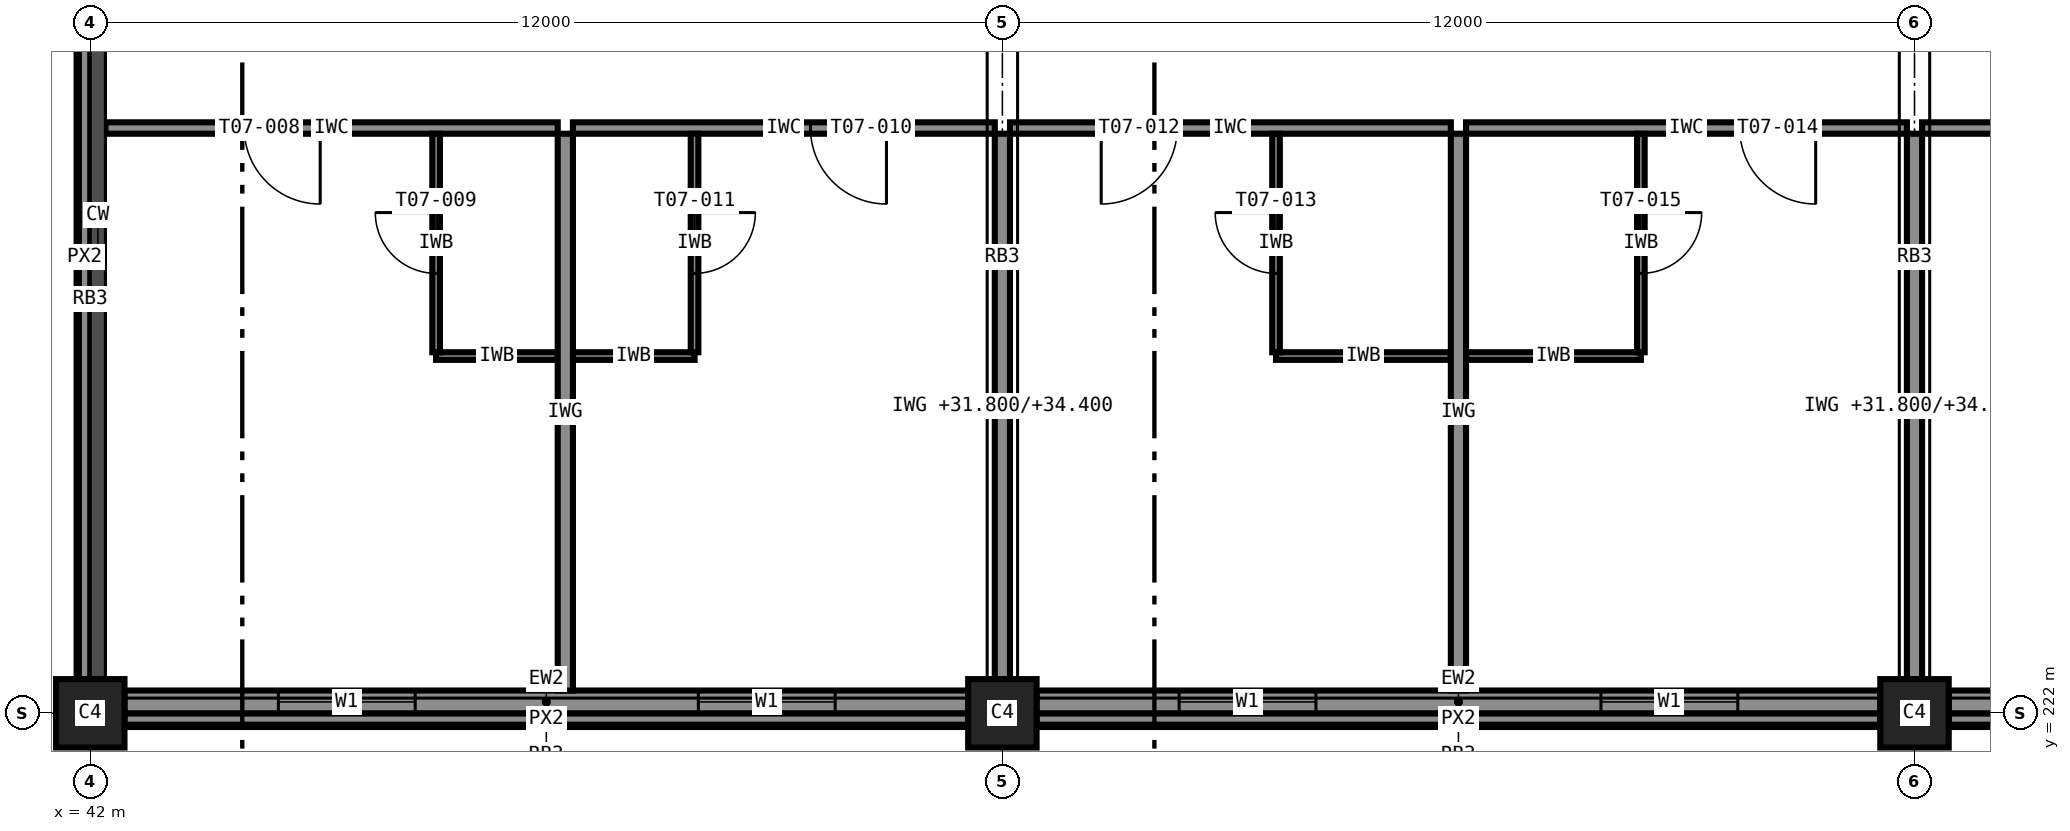
"""IFC4 building model, lengths in metres.
Left out: names, types, materials, properties, quantities, classifications, styles, units other than length and angle.
Written with IfcOpenShell. Run it as: python <this file> out.ifc"""

import sys

from ifc_helpers import new_model, si_unit, direction, frame, frame_2d, origin, origin_2d, place, context, subcontext, project, spatial, rectangle, extrude, element, fill, save


model = new_model("IFC4")
c1 = context("Model", 3, precision=1e-05, world=origin(), true_north=direction((0.0, 1.0)))
c2 = subcontext(c1, "Body", "Model", "MODEL_VIEW")
j1 = project(units=[si_unit("LENGTHUNIT", "METRE"), si_unit("PLANEANGLEUNIT", "RADIAN")], contexts=[c1])
p1 = place(None, origin())
s1 = spatial("IfcSite", under=j1, at=p1, CompositionType="ELEMENT")
p2 = place(p1, origin())
s2 = spatial("IfcBuilding", under=s1, at=p2, CompositionType="ELEMENT")
p3 = place(p2, frame((0.0, 0.0, 31.8)))
s3 = spatial("IfcBuildingStorey", under=s2, at=p3, CompositionType="ELEMENT", Elevation=31.8)
for number, where, z_axis, x_axis in (
    (1, (42.0, 222.0, 0.0), (0.0, 0.0, 1.0), (1.0, 0.0, 0.0)),
    (2, (54.0, 222.0, 0.0), (0.0, 0.0, 1.0), (1.0, 0.0, 0.0)),
    (3, (66.0, 222.0, 0.0), (0.0, 0.0, 1.0), (1.0, 0.0, 0.0)),
):
    element("IfcColumn", number, at=place(p3, frame(where, z_axis=z_axis, x_axis=x_axis)), inside=s3, PredefinedType="COLUMN", context=c2, shape_type="SweptSolid", body=[
        extrude(rectangle(XDim=0.9, YDim=0.9, at=origin_2d()), origin(), (0.0, 0.0, 1.0), 3.6),
    ])
p4 = place(p3, frame((42.45, 222.15, 0.0), z_axis=(0.0, 0.0, 1.0), x_axis=(1.0, 0.0, 0.0)))
e4 = element("IfcWall", 4, at=p4, inside=s3, PredefinedType="STANDARD", context=c2, shape_type="SweptSolid", body=[
    extrude(rectangle(XDim=11.1, YDim=0.3, at=frame_2d((5.55, 0.0))), origin(), (0.0, 0.0, 1.0), 2.6),
])
p5 = place(p4, frame((2.025, 0.0, 0.85)))
e5 = element("IfcOpeningElement", 5, at=p5, cuts=e4, PredefinedType="OPENING", context=c2, shape_type="SweptSolid", body=[
    extrude(rectangle(XDim=1.8, YDim=1.75, at=frame_2d((0.9, 0.875))), frame((0.0, 0.16, 0.0), z_axis=(0.0, -1.0, 0.0), x_axis=(1.0, 0.0, 0.0)), (0.0, 0.0, 1.0), 0.32),
])
p6 = place(p4, frame((7.55, 0.0, 0.85)))
e6 = element("IfcOpeningElement", 6, at=p6, cuts=e4, PredefinedType="OPENING", context=c2, shape_type="SweptSolid", body=[
    extrude(rectangle(XDim=1.8, YDim=1.75, at=frame_2d((0.9, 0.875))), frame((0.0, 0.16, 0.0), z_axis=(0.0, -1.0, 0.0), x_axis=(1.0, 0.0, 0.0)), (0.0, 0.0, 1.0), 0.32),
])
p7 = place(p3, frame((54.45, 222.15, 0.0), z_axis=(0.0, 0.0, 1.0), x_axis=(1.0, 0.0, 0.0)))
e7 = element("IfcWall", 7, at=p7, inside=s3, PredefinedType="STANDARD", context=c2, shape_type="SweptSolid", body=[
    extrude(rectangle(XDim=11.1, YDim=0.3, at=frame_2d((5.55, 0.0))), origin(), (0.0, 0.0, 1.0), 2.6),
])
p8 = place(p7, frame((1.875, 0.0, 0.85)))
e8 = element("IfcOpeningElement", 8, at=p8, cuts=e7, PredefinedType="OPENING", context=c2, shape_type="SweptSolid", body=[
    extrude(rectangle(XDim=1.8, YDim=1.75, at=frame_2d((0.9, 0.875))), frame((0.0, 0.16, 0.0), z_axis=(0.0, -1.0, 0.0), x_axis=(1.0, 0.0, 0.0)), (0.0, 0.0, 1.0), 0.32),
])
p9 = place(p7, frame((7.425, 0.0, 0.85)))
e9 = element("IfcOpeningElement", 9, at=p9, cuts=e7, PredefinedType="OPENING", context=c2, shape_type="SweptSolid", body=[
    extrude(rectangle(XDim=1.8, YDim=1.75, at=frame_2d((0.9, 0.875))), frame((0.0, 0.16, 0.0), z_axis=(0.0, -1.0, 0.0), x_axis=(1.0, 0.0, 0.0)), (0.0, 0.0, 1.0), 0.32),
])
p10 = place(p3, frame((66.45, 222.15, 0.0), z_axis=(0.0, 0.0, 1.0), x_axis=(1.0, 0.0, 0.0)))
e10 = element("IfcWall", 10, at=p10, inside=s3, PredefinedType="STANDARD", context=c2, shape_type="SweptSolid", body=[
    extrude(rectangle(XDim=11.1, YDim=0.3, at=frame_2d((5.55, 0.0))), origin(), (0.0, 0.0, 1.0), 2.6),
])
p11 = place(p10, frame((0.95, 0.0, 0.85)))
e11 = element("IfcOpeningElement", 11, at=p11, cuts=e10, PredefinedType="OPENING", context=c2, shape_type="SweptSolid", body=[
    extrude(rectangle(XDim=1.8, YDim=1.75, at=frame_2d((0.9, 0.875))), frame((0.0, 0.16, 0.0), z_axis=(0.0, -1.0, 0.0), x_axis=(1.0, 0.0, 0.0)), (0.0, 0.0, 1.0), 0.32),
])
p12 = place(p10, frame((4.65, 0.0, 0.85)))
e12 = element("IfcOpeningElement", 12, at=p12, cuts=e10, PredefinedType="OPENING", context=c2, shape_type="SweptSolid", body=[
    extrude(rectangle(XDim=1.8, YDim=1.75, at=frame_2d((0.9, 0.875))), frame((0.0, 0.16, 0.0), z_axis=(0.0, -1.0, 0.0), x_axis=(1.0, 0.0, 0.0)), (0.0, 0.0, 1.0), 0.32),
])
p13 = place(p10, frame((8.35, 0.0, 0.85)))
e13 = element("IfcOpeningElement", 13, at=p13, cuts=e10, PredefinedType="OPENING", context=c2, shape_type="SweptSolid", body=[
    extrude(rectangle(XDim=1.8, YDim=1.75, at=frame_2d((0.9, 0.875))), frame((0.0, 0.16, 0.0), z_axis=(0.0, -1.0, 0.0), x_axis=(1.0, 0.0, 0.0)), (0.0, 0.0, 1.0), 0.32),
])
for number, where, z_axis, x_axis in (
    (14, (42.45, 221.925, 3.4), (0.0, 0.0, 1.0), (1.0, 0.0, 0.0)),
    (15, (54.45, 221.925, 3.4), (0.0, 0.0, 1.0), (1.0, 0.0, 0.0)),
    (16, (66.45, 221.925, 3.4), (0.0, 0.0, 1.0), (1.0, 0.0, 0.0)),
    (17, (41.925, 233.55, 3.4), (0.0, 0.0, 1.0), (0.0, -1.0, 0.0)),
):
    element("IfcWall", number, at=place(p3, frame(where, z_axis=z_axis, x_axis=x_axis)), inside=s3, PredefinedType="STANDARD", context=c2, shape_type="SweptSolid", body=[
        extrude(rectangle(XDim=11.1, YDim=0.15, at=frame_2d((5.55, 0.0))), origin(), (0.0, 0.0, 1.0), 0.2),
    ])
p14 = place(p3, frame((48.15, 229.7, 0.0), z_axis=(0.0, 0.0, 1.0), x_axis=(-1.0, 0.0, 0.0)))
e18 = element("IfcWall", 18, at=p14, inside=s3, PredefinedType="PARTITIONING", context=c2, shape_type="SweptSolid", body=[
    extrude(rectangle(XDim=5.95, YDim=0.15, at=frame_2d((2.975, 0.0))), origin(), (0.0, 0.0, 1.0), 3.4),
])
p15 = place(p14, frame((3.125, 0.0, 0.0)))
e19 = element("IfcOpeningElement", 19, at=p15, cuts=e18, PredefinedType="OPENING", context=c2, shape_type="SweptSolid", body=[
    extrude(rectangle(XDim=1.0, YDim=2.1, at=frame_2d((0.5, 1.05))), frame((0.0, 0.085, 0.0), z_axis=(0.0, -1.0, 0.0), x_axis=(1.0, 0.0, 0.0)), (0.0, 0.0, 1.0), 0.17),
])
p16 = place(p3, frame((46.55, 226.7, 0.0), z_axis=(0.0, 0.0, 1.0), x_axis=(1.0, 0.0, 0.0)))
e20 = element("IfcWall", 20, at=p16, inside=s3, PredefinedType="PARTITIONING", context=c2, shape_type="SweptSolid", body=[
    extrude(rectangle(XDim=1.6, YDim=0.1, at=frame_2d((0.8, 0.0))), origin(), (0.0, 0.0, 1.0), 3.4),
])
p17 = place(p3, frame((46.55, 226.75, 0.0), z_axis=(0.0, 0.0, 1.0), x_axis=(0.0, 1.0, 0.0)))
e21 = element("IfcWall", 21, at=p17, inside=s3, PredefinedType="PARTITIONING", context=c2, shape_type="SweptSolid", body=[
    extrude(rectangle(XDim=2.875, YDim=0.1, at=frame_2d((1.438, 0.0))), origin(), (0.0, 0.0, 1.0), 3.4),
])
p18 = place(p17, frame((1.038, 0.0, 0.0)))
e22 = element("IfcOpeningElement", 22, at=p18, cuts=e21, PredefinedType="OPENING", context=c2, shape_type="SweptSolid", body=[
    extrude(rectangle(XDim=0.8, YDim=2.1, at=frame_2d((0.4, 1.05))), frame((0.0, 0.06, 0.0), z_axis=(0.0, -1.0, 0.0), x_axis=(1.0, 0.0, 0.0)), (0.0, 0.0, 1.0), 0.12),
])
p19 = place(p3, frame((53.9, 229.7, 0.0), z_axis=(0.0, 0.0, 1.0), x_axis=(-1.0, 0.0, 0.0)))
e23 = element("IfcWall", 23, at=p19, inside=s3, PredefinedType="PARTITIONING", context=c2, shape_type="SweptSolid", body=[
    extrude(rectangle(XDim=5.55, YDim=0.15, at=frame_2d((2.775, 0.0))), origin(), (0.0, 0.0, 1.0), 3.4),
])
p20 = place(p19, frame((1.425, 0.0, 0.0)))
e24 = element("IfcOpeningElement", 24, at=p20, cuts=e23, PredefinedType="OPENING", context=c2, shape_type="SweptSolid", body=[
    extrude(rectangle(XDim=1.0, YDim=2.1, at=frame_2d((0.5, 1.05))), frame((0.0, 0.085, 0.0), z_axis=(0.0, -1.0, 0.0), x_axis=(1.0, 0.0, 0.0)), (0.0, 0.0, 1.0), 0.17),
])
p21 = place(p3, frame((48.35, 226.7, 0.0), z_axis=(0.0, 0.0, 1.0), x_axis=(1.0, 0.0, 0.0)))
e25 = element("IfcWall", 25, at=p21, inside=s3, PredefinedType="PARTITIONING", context=c2, shape_type="SweptSolid", body=[
    extrude(rectangle(XDim=1.6, YDim=0.1, at=frame_2d((0.8, 0.0))), origin(), (0.0, 0.0, 1.0), 3.4),
])
p22 = place(p3, frame((49.95, 229.625, 0.0), z_axis=(0.0, 0.0, 1.0), x_axis=(0.0, -1.0, 0.0)))
e26 = element("IfcWall", 26, at=p22, inside=s3, PredefinedType="PARTITIONING", context=c2, shape_type="SweptSolid", body=[
    extrude(rectangle(XDim=2.875, YDim=0.1, at=frame_2d((1.438, 0.0))), origin(), (0.0, 0.0, 1.0), 3.4),
])
p23 = place(p22, frame((1.038, 0.0, 0.0)))
e27 = element("IfcOpeningElement", 27, at=p23, cuts=e26, PredefinedType="OPENING", context=c2, shape_type="SweptSolid", body=[
    extrude(rectangle(XDim=0.8, YDim=2.1, at=frame_2d((0.4, 1.05))), frame((0.0, 0.06, 0.0), z_axis=(0.0, -1.0, 0.0), x_axis=(1.0, 0.0, 0.0)), (0.0, 0.0, 1.0), 0.12),
])
p24 = place(p3, frame((59.9, 229.7, 0.0), z_axis=(0.0, 0.0, 1.0), x_axis=(-1.0, 0.0, 0.0)))
e28 = element("IfcWall", 28, at=p24, inside=s3, PredefinedType="PARTITIONING", context=c2, shape_type="SweptSolid", body=[
    extrude(rectangle(XDim=5.8, YDim=0.15, at=frame_2d((2.9, 0.0))), origin(), (0.0, 0.0, 1.0), 3.4),
])
p25 = place(p24, frame((3.6, 0.0, 0.0)))
e29 = element("IfcOpeningElement", 29, at=p25, cuts=e28, PredefinedType="OPENING", context=c2, shape_type="SweptSolid", body=[
    extrude(rectangle(XDim=1.0, YDim=2.1, at=frame_2d((0.5, 1.05))), frame((0.0, 0.085, 0.0), z_axis=(0.0, -1.0, 0.0), x_axis=(1.0, 0.0, 0.0)), (0.0, 0.0, 1.0), 0.17),
])
p26 = place(p3, frame((57.6, 226.7, 0.0), z_axis=(0.0, 0.0, 1.0), x_axis=(1.0, 0.0, 0.0)))
e30 = element("IfcWall", 30, at=p26, inside=s3, PredefinedType="PARTITIONING", context=c2, shape_type="SweptSolid", body=[
    extrude(rectangle(XDim=2.3, YDim=0.1, at=frame_2d((1.15, 0.0))), origin(), (0.0, 0.0, 1.0), 3.4),
])
p27 = place(p3, frame((57.6, 226.75, 0.0), z_axis=(0.0, 0.0, 1.0), x_axis=(0.0, 1.0, 0.0)))
e31 = element("IfcWall", 31, at=p27, inside=s3, PredefinedType="PARTITIONING", context=c2, shape_type="SweptSolid", body=[
    extrude(rectangle(XDim=2.875, YDim=0.1, at=frame_2d((1.438, 0.0))), origin(), (0.0, 0.0, 1.0), 3.4),
])
p28 = place(p27, frame((1.038, 0.0, 0.0)))
e32 = element("IfcOpeningElement", 32, at=p28, cuts=e31, PredefinedType="OPENING", context=c2, shape_type="SweptSolid", body=[
    extrude(rectangle(XDim=0.8, YDim=2.1, at=frame_2d((0.4, 1.05))), frame((0.0, 0.06, 0.0), z_axis=(0.0, -1.0, 0.0), x_axis=(1.0, 0.0, 0.0)), (0.0, 0.0, 1.0), 0.12),
])
p29 = place(p3, frame((65.9, 229.7, 0.0), z_axis=(0.0, 0.0, 1.0), x_axis=(-1.0, 0.0, 0.0)))
e33 = element("IfcWall", 33, at=p29, inside=s3, PredefinedType="PARTITIONING", context=c2, shape_type="SweptSolid", body=[
    extrude(rectangle(XDim=5.8, YDim=0.15, at=frame_2d((2.9, 0.0))), origin(), (0.0, 0.0, 1.0), 3.4),
])
p30 = place(p29, frame((1.2, 0.0, 0.0)))
e34 = element("IfcOpeningElement", 34, at=p30, cuts=e33, PredefinedType="OPENING", context=c2, shape_type="SweptSolid", body=[
    extrude(rectangle(XDim=1.0, YDim=2.1, at=frame_2d((0.5, 1.05))), frame((0.0, 0.085, 0.0), z_axis=(0.0, -1.0, 0.0), x_axis=(1.0, 0.0, 0.0)), (0.0, 0.0, 1.0), 0.17),
])
p31 = place(p3, frame((60.1, 226.7, 0.0), z_axis=(0.0, 0.0, 1.0), x_axis=(1.0, 0.0, 0.0)))
e35 = element("IfcWall", 35, at=p31, inside=s3, PredefinedType="PARTITIONING", context=c2, shape_type="SweptSolid", body=[
    extrude(rectangle(XDim=2.3, YDim=0.1, at=frame_2d((1.15, 0.0))), origin(), (0.0, 0.0, 1.0), 3.4),
])
p32 = place(p3, frame((62.4, 229.625, 0.0), z_axis=(0.0, 0.0, 1.0), x_axis=(0.0, -1.0, 0.0)))
e36 = element("IfcWall", 36, at=p32, inside=s3, PredefinedType="PARTITIONING", context=c2, shape_type="SweptSolid", body=[
    extrude(rectangle(XDim=2.875, YDim=0.1, at=frame_2d((1.438, 0.0))), origin(), (0.0, 0.0, 1.0), 3.4),
])
p33 = place(p32, frame((1.038, 0.0, 0.0)))
e37 = element("IfcOpeningElement", 37, at=p33, cuts=e36, PredefinedType="OPENING", context=c2, shape_type="SweptSolid", body=[
    extrude(rectangle(XDim=0.8, YDim=2.1, at=frame_2d((0.4, 1.05))), frame((0.0, 0.06, 0.0), z_axis=(0.0, -1.0, 0.0), x_axis=(1.0, 0.0, 0.0)), (0.0, 0.0, 1.0), 0.12),
])
p34 = place(p3, frame((77.9, 229.7, 0.0), z_axis=(0.0, 0.0, 1.0), x_axis=(-1.0, 0.0, 0.0)))
e38 = element("IfcWall", 38, at=p34, inside=s3, PredefinedType="PARTITIONING", context=c2, shape_type="SweptSolid", body=[
    extrude(rectangle(XDim=11.8, YDim=0.15, at=frame_2d((5.9, 0.0))), origin(), (0.0, 0.0, 1.0), 3.4),
])
p35 = place(p34, frame((5.0, 0.0, 0.0)))
e39 = element("IfcOpeningElement", 39, at=p35, cuts=e38, PredefinedType="OPENING", context=c2, shape_type="SweptSolid", body=[
    extrude(rectangle(XDim=1.8, YDim=2.1, at=frame_2d((0.9, 1.05))), frame((0.0, 0.085, 0.0), z_axis=(0.0, -1.0, 0.0), x_axis=(1.0, 0.0, 0.0)), (0.0, 0.0, 1.0), 0.17),
])
p36 = place(p3, frame((48.25, 222.3, 0.0), z_axis=(0.0, 0.0, 1.0), x_axis=(0.0, 1.0, 0.0)))
e40 = element("IfcWall", 40, at=p36, inside=s3, PredefinedType="PARTITIONING", context=c2, shape_type="SweptSolid", body=[
    extrude(rectangle(XDim=7.325, YDim=0.2, at=frame_2d((3.663, 0.0))), origin(), (0.0, 0.0, 1.0), 3.4),
])
p37 = place(p3, frame((54.0, 222.45, 0.0), z_axis=(0.0, 0.0, 1.0), x_axis=(0.0, 1.0, 0.0)))
e41 = element("IfcWall", 41, at=p37, inside=s3, PredefinedType="PARTITIONING", context=c2, shape_type="SweptSolid", body=[
    extrude(rectangle(XDim=7.175, YDim=0.2, at=frame_2d((3.587, 0.0))), origin(), (0.0, 0.0, 1.0), 2.6),
])
p38 = place(p3, frame((60.0, 222.3, 0.0), z_axis=(0.0, 0.0, 1.0), x_axis=(0.0, 1.0, 0.0)))
e42 = element("IfcWall", 42, at=p38, inside=s3, PredefinedType="PARTITIONING", context=c2, shape_type="SweptSolid", body=[
    extrude(rectangle(XDim=7.325, YDim=0.2, at=frame_2d((3.663, 0.0))), origin(), (0.0, 0.0, 1.0), 3.4),
])
p39 = place(p3, frame((66.0, 222.45, 0.0), z_axis=(0.0, 0.0, 1.0), x_axis=(0.0, 1.0, 0.0)))
e43 = element("IfcWall", 43, at=p39, inside=s3, PredefinedType="PARTITIONING", context=c2, shape_type="SweptSolid", body=[
    extrude(rectangle(XDim=7.175, YDim=0.2, at=frame_2d((3.587, 0.0))), origin(), (0.0, 0.0, 1.0), 2.6),
])
p40 = place(p5, origin())
e44 = element("IfcWindow", 44, at=p40, inside=s3, PartitioningType="SINGLE_PANEL", PredefinedType="WINDOW", context=c2, shape_type="SweptSolid", body=[
    extrude(rectangle(XDim=1.8, YDim=1.75, at=frame_2d((0.9, 0.875))), frame((0.0, 0.03, 0.0), z_axis=(0.0, -1.0, 0.0), x_axis=(1.0, 0.0, 0.0)), (0.0, 0.0, 1.0), 0.06),
])
fill(e5, e44)
p41 = place(p6, origin())
e45 = element("IfcWindow", 45, at=p41, inside=s3, PartitioningType="SINGLE_PANEL", PredefinedType="WINDOW", context=c2, shape_type="SweptSolid", body=[
    extrude(rectangle(XDim=1.8, YDim=1.75, at=frame_2d((0.9, 0.875))), frame((0.0, 0.03, 0.0), z_axis=(0.0, -1.0, 0.0), x_axis=(1.0, 0.0, 0.0)), (0.0, 0.0, 1.0), 0.06),
])
fill(e6, e45)
p42 = place(p8, origin())
e46 = element("IfcWindow", 46, at=p42, inside=s3, PartitioningType="SINGLE_PANEL", PredefinedType="WINDOW", context=c2, shape_type="SweptSolid", body=[
    extrude(rectangle(XDim=1.8, YDim=1.75, at=frame_2d((0.9, 0.875))), frame((0.0, 0.03, 0.0), z_axis=(0.0, -1.0, 0.0), x_axis=(1.0, 0.0, 0.0)), (0.0, 0.0, 1.0), 0.06),
])
fill(e8, e46)
p43 = place(p9, origin())
e47 = element("IfcWindow", 47, at=p43, inside=s3, PartitioningType="SINGLE_PANEL", PredefinedType="WINDOW", context=c2, shape_type="SweptSolid", body=[
    extrude(rectangle(XDim=1.8, YDim=1.75, at=frame_2d((0.9, 0.875))), frame((0.0, 0.03, 0.0), z_axis=(0.0, -1.0, 0.0), x_axis=(1.0, 0.0, 0.0)), (0.0, 0.0, 1.0), 0.06),
])
fill(e9, e47)
p44 = place(p15, origin())
e48 = element("IfcDoor", 48, at=p44, inside=s3, OperationType="SINGLE_SWING_LEFT", PredefinedType="DOOR", context=c2, shape_type="SweptSolid", body=[
    extrude(rectangle(XDim=1.0, YDim=2.1, at=frame_2d((0.5, 1.05))), frame((0.0, 0.025, 0.0), z_axis=(0.0, -1.0, 0.0), x_axis=(1.0, 0.0, 0.0)), (0.0, 0.0, 1.0), 0.05),
])
fill(e19, e48)
p45 = place(p18, origin())
e49 = element("IfcDoor", 49, at=p45, inside=s3, OperationType="SINGLE_SWING_RIGHT", PredefinedType="DOOR", context=c2, shape_type="SweptSolid", body=[
    extrude(rectangle(XDim=0.8, YDim=2.1, at=frame_2d((0.4, 1.05))), frame((0.0, 0.025, 0.0), z_axis=(0.0, -1.0, 0.0), x_axis=(1.0, 0.0, 0.0)), (0.0, 0.0, 1.0), 0.05),
])
fill(e22, e49)
p46 = place(p20, origin())
e50 = element("IfcDoor", 50, at=p46, inside=s3, OperationType="SINGLE_SWING_LEFT", PredefinedType="DOOR", context=c2, shape_type="SweptSolid", body=[
    extrude(rectangle(XDim=1.0, YDim=2.1, at=frame_2d((0.5, 1.05))), frame((0.0, 0.025, 0.0), z_axis=(0.0, -1.0, 0.0), x_axis=(1.0, 0.0, 0.0)), (0.0, 0.0, 1.0), 0.05),
])
fill(e24, e50)
p47 = place(p23, origin())
e51 = element("IfcDoor", 51, at=p47, inside=s3, OperationType="SINGLE_SWING_LEFT", PredefinedType="DOOR", context=c2, shape_type="SweptSolid", body=[
    extrude(rectangle(XDim=0.8, YDim=2.1, at=frame_2d((0.4, 1.05))), frame((0.0, 0.025, 0.0), z_axis=(0.0, -1.0, 0.0), x_axis=(1.0, 0.0, 0.0)), (0.0, 0.0, 1.0), 0.05),
])
fill(e27, e51)
p48 = place(p25, origin())
e52 = element("IfcDoor", 52, at=p48, inside=s3, OperationType="SINGLE_SWING_RIGHT", PredefinedType="DOOR", context=c2, shape_type="SweptSolid", body=[
    extrude(rectangle(XDim=1.0, YDim=2.1, at=frame_2d((0.5, 1.05))), frame((0.0, 0.025, 0.0), z_axis=(0.0, -1.0, 0.0), x_axis=(1.0, 0.0, 0.0)), (0.0, 0.0, 1.0), 0.05),
])
fill(e29, e52)
p49 = place(p28, origin())
e53 = element("IfcDoor", 53, at=p49, inside=s3, OperationType="SINGLE_SWING_RIGHT", PredefinedType="DOOR", context=c2, shape_type="SweptSolid", body=[
    extrude(rectangle(XDim=0.8, YDim=2.1, at=frame_2d((0.4, 1.05))), frame((0.0, 0.025, 0.0), z_axis=(0.0, -1.0, 0.0), x_axis=(1.0, 0.0, 0.0)), (0.0, 0.0, 1.0), 0.05),
])
fill(e32, e53)
p50 = place(p30, origin())
e54 = element("IfcDoor", 54, at=p50, inside=s3, OperationType="SINGLE_SWING_LEFT", PredefinedType="DOOR", context=c2, shape_type="SweptSolid", body=[
    extrude(rectangle(XDim=1.0, YDim=2.1, at=frame_2d((0.5, 1.05))), frame((0.0, 0.025, 0.0), z_axis=(0.0, -1.0, 0.0), x_axis=(1.0, 0.0, 0.0)), (0.0, 0.0, 1.0), 0.05),
])
fill(e34, e54)
p51 = place(p33, origin())
e55 = element("IfcDoor", 55, at=p51, inside=s3, OperationType="SINGLE_SWING_LEFT", PredefinedType="DOOR", context=c2, shape_type="SweptSolid", body=[
    extrude(rectangle(XDim=0.8, YDim=2.1, at=frame_2d((0.4, 1.05))), frame((0.0, 0.025, 0.0), z_axis=(0.0, -1.0, 0.0), x_axis=(1.0, 0.0, 0.0)), (0.0, 0.0, 1.0), 0.05),
])
fill(e37, e55)
save(model, sys.argv[1])
